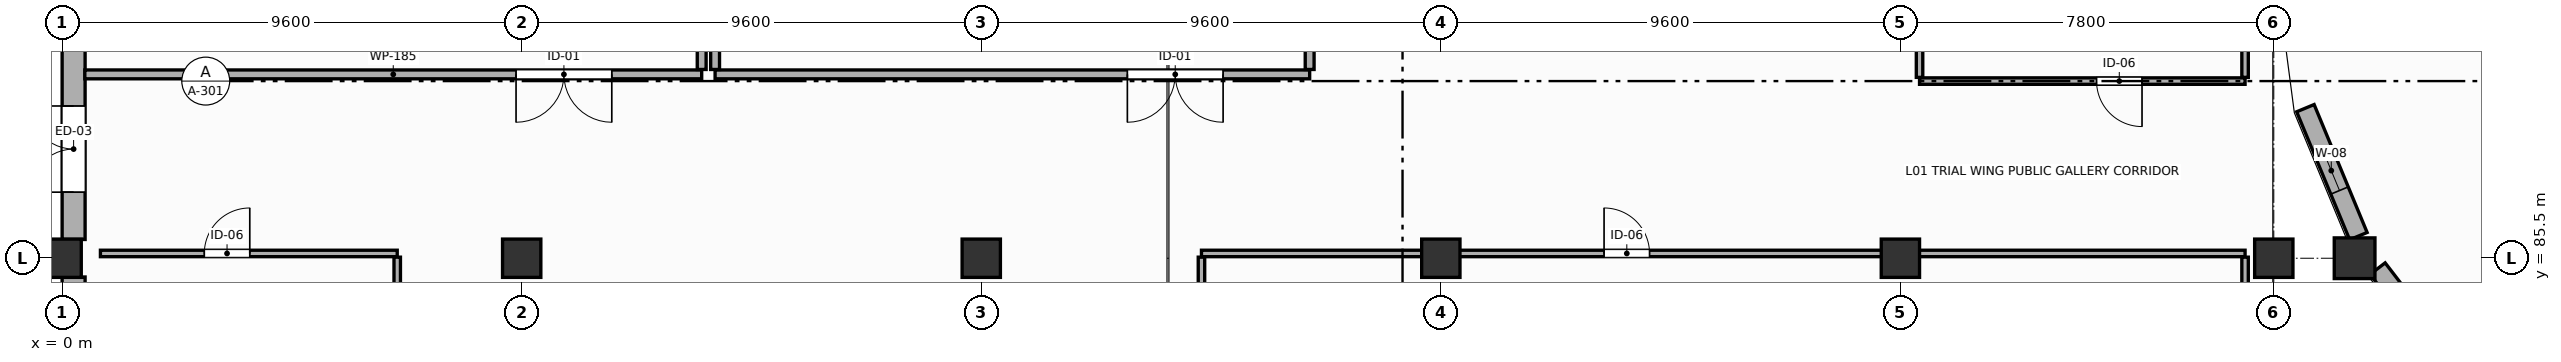
"""IFC4 building model, lengths in metres.
Left out: names, types, materials, properties, quantities, classifications, styles, units other than length and angle.
Written with IfcOpenShell. Run it as: python <this file> out.ifc"""

import sys

from ifc_helpers import new_model, si_unit, direction, frame, frame_2d, origin, origin_2d, place, context, subcontext, project, spatial, rectangle, circle, extrude, element, fill, save


model = new_model("IFC4")
c1 = context("Model", 3, precision=1e-05, world=origin(), true_north=direction((0.0, 1.0)))
c2 = subcontext(c1, "Body", "Model", "MODEL_VIEW")
j1 = project(units=[si_unit("LENGTHUNIT", "METRE"), si_unit("PLANEANGLEUNIT", "RADIAN")], contexts=[c1])
p1 = place(None, origin())
s1 = spatial("IfcSite", under=j1, at=p1, CompositionType="ELEMENT")
p2 = place(p1, origin())
s2 = spatial("IfcBuilding", under=s1, at=p2, CompositionType="ELEMENT")
p3 = place(p2, origin())
s3 = spatial("IfcBuildingStorey", under=s2, at=p3, CompositionType="ELEMENT", Elevation=0.0)
p4 = place(p3, frame((47.888, 85.5, 0.0), z_axis=(0.0, 0.0, 1.0), x_axis=(1.0, 0.0, 0.0)))
e1 = element("IfcColumn", 1, at=p4, inside=s3, PredefinedType="COLUMN", context=c2, shape_type="SweptSolid", body=[
    extrude(circle(Radius=0.425, at=origin_2d()), origin(), (0.0, 0.0, 1.0), 5.4),
])
for number, where, z_axis, x_axis in (
    (2, (0.0, 85.5, 0.0), (0.0, 0.0, 1.0), (1.0, 0.0, 0.0)),
    (3, (9.6, 85.5, 0.0), (0.0, 0.0, 1.0), (1.0, 0.0, 0.0)),
    (4, (19.2, 85.5, 0.0), (0.0, 0.0, 1.0), (1.0, 0.0, 0.0)),
    (5, (28.8, 85.5, 0.0), (0.0, 0.0, 1.0), (1.0, 0.0, 0.0)),
    (6, (38.4, 85.5, 0.0), (0.0, 0.0, 1.0), (1.0, 0.0, 0.0)),
    (7, (46.2, 85.5, 0.0), (0.0, 0.0, 1.0), (1.0, 0.0, 0.0)),
):
    element("IfcColumn", number, at=place(p3, frame(where, z_axis=z_axis, x_axis=x_axis)), inside=s3, PredefinedType="COLUMN", context=c2, shape_type="SweptSolid", body=[
        extrude(rectangle(XDim=0.8, YDim=0.8, at=origin_2d()), origin(), (0.0, 0.0, 1.0), 5.4),
    ])
p5 = place(p3, frame((46.86, 88.635, 0.0), z_axis=(0.0, 0.0, 1.0), x_axis=(0.382642547526, -0.923896466506, 0.0)))
e8 = element("IfcWall", 8, at=p5, inside=s3, PredefinedType="ELEMENTEDWALL", context=c2, shape_type="SweptSolid", body=[
    extrude(rectangle(XDim=2.892, YDim=0.395, at=frame_2d((1.446, 0.0))), origin(), (0.0, 0.0, 1.0), 4.27),
])
p6 = place(p5, frame((0.962, 0.0, 0.85)))
e9 = element("IfcOpeningElement", 9, at=p6, cuts=e8, PredefinedType="OPENING", context=c2, shape_type="SweptSolid", body=[
    extrude(rectangle(XDim=0.9, YDim=1.85, at=frame_2d((0.45, 0.925))), frame((0.0, 0.208, 0.0), z_axis=(0.0, -1.0, 0.0), x_axis=(1.0, 0.0, 0.0)), (0.0, 0.0, 1.0), 0.415),
])
p7 = place(p3, frame((48.369, 85.283, 0.0), z_axis=(0.0, 0.0, 1.0), x_axis=(0.608787157184, -0.793333597705, 0.0)))
e10 = element("IfcWall", 10, at=p7, inside=s3, PredefinedType="ELEMENTEDWALL", context=c2, shape_type="SweptSolid", body=[
    extrude(rectangle(XDim=2.824, YDim=0.395, at=frame_2d((1.412, 0.0))), origin(), (0.0, 0.0, 1.0), 4.27),
])
p8 = place(p7, frame((0.962, 0.0, 0.85)))
e11 = element("IfcOpeningElement", 11, at=p8, cuts=e10, PredefinedType="OPENING", context=c2, shape_type="SweptSolid", body=[
    extrude(rectangle(XDim=0.9, YDim=1.85, at=frame_2d((0.45, 0.925))), frame((0.0, 0.208, 0.0), z_axis=(0.0, -1.0, 0.0), x_axis=(1.0, 0.0, 0.0)), (0.0, 0.0, 1.0), 0.415),
])
p9 = place(p3, frame((0.24, 74.792, 0.0), z_axis=(0.0, 0.0, 1.0), x_axis=(0.0, 1.0, 0.0)))
e12 = element("IfcWall", 12, at=p9, inside=s3, PredefinedType="STANDARD", context=c2, shape_type="SweptSolid", body=[
    extrude(rectangle(XDim=10.316, YDim=0.48, at=frame_2d((5.158, 0.0))), origin(), (0.0, 0.0, 1.0), 4.23),
])
p10 = place(p9, frame((1.295, 0.0, 0.85)))
e13 = element("IfcOpeningElement", 13, at=p10, cuts=e12, PredefinedType="OPENING", context=c2, shape_type="SweptSolid", body=[
    extrude(rectangle(XDim=1.7, YDim=2.3, at=frame_2d((0.85, 1.15))), frame((0.0, 0.25, 0.0), z_axis=(0.0, -1.0, 0.0), x_axis=(1.0, 0.0, 0.0)), (0.0, 0.0, 1.0), 0.5),
])
p11 = place(p9, frame((4.308, 0.0, 0.85)))
e14 = element("IfcOpeningElement", 14, at=p11, cuts=e12, PredefinedType="OPENING", context=c2, shape_type="SweptSolid", body=[
    extrude(rectangle(XDim=1.7, YDim=2.3, at=frame_2d((0.85, 1.15))), frame((0.0, 0.25, 0.0), z_axis=(0.0, -1.0, 0.0), x_axis=(1.0, 0.0, 0.0)), (0.0, 0.0, 1.0), 0.5),
])
p12 = place(p9, frame((7.321, 0.0, 0.85)))
e15 = element("IfcOpeningElement", 15, at=p12, cuts=e12, PredefinedType="OPENING", context=c2, shape_type="SweptSolid", body=[
    extrude(rectangle(XDim=1.7, YDim=2.3, at=frame_2d((0.85, 1.15))), frame((0.0, 0.25, 0.0), z_axis=(0.0, -1.0, 0.0), x_axis=(1.0, 0.0, 0.0)), (0.0, 0.0, 1.0), 0.5),
])
p13 = place(p3, frame((0.24, 85.892, 0.0), z_axis=(0.0, 0.0, 1.0), x_axis=(0.0, 1.0, 0.0)))
e16 = element("IfcWall", 16, at=p13, inside=s3, PredefinedType="STANDARD", context=c2, shape_type="SweptSolid", body=[
    extrude(rectangle(XDim=11.816, YDim=0.48, at=frame_2d((5.908, 0.0))), origin(), (0.0, 0.0, 1.0), 4.18),
])
p14 = place(p13, frame((0.988, 0.0, 0.0)))
e17 = element("IfcOpeningElement", 17, at=p14, cuts=e16, PredefinedType="OPENING", context=c2, shape_type="SweptSolid", body=[
    extrude(rectangle(XDim=1.8, YDim=2.25, at=frame_2d((0.9, 1.125))), frame((0.0, 0.25, 0.0), z_axis=(0.0, -1.0, 0.0), x_axis=(1.0, 0.0, 0.0)), (0.0, 0.0, 1.0), 0.5),
])
p15 = place(p3, frame((13.36, 89.34, 0.0), z_axis=(0.0, 0.0, 1.0), x_axis=(-1.0, 0.0, 0.0)))
e18 = element("IfcWall", 18, at=p15, inside=s3, PredefinedType="PARTITIONING", context=c2, shape_type="SweptSolid", body=[
    extrude(rectangle(XDim=12.886, YDim=0.185, at=frame_2d((6.443, 0.0))), origin(), (0.0, 0.0, 1.0), 4.23),
])
p16 = place(p15, frame((1.878, 0.0, 0.0)))
e19 = element("IfcOpeningElement", 19, at=p16, cuts=e18, PredefinedType="OPENING", context=c2, shape_type="SweptSolid", body=[
    extrude(rectangle(XDim=2.0, YDim=2.5, at=frame_2d((1.0, 1.25))), frame((0.0, 0.103, 0.0), z_axis=(0.0, -1.0, 0.0), x_axis=(1.0, 0.0, 0.0)), (0.0, 0.0, 1.0), 0.205),
])
p17 = place(p3, frame((13.36, 112.326, 0.0), z_axis=(0.0, 0.0, 1.0), x_axis=(0.0, -1.0, 0.0)))
e20 = element("IfcWall", 20, at=p17, inside=s3, PredefinedType="PARTITIONING", context=c2, shape_type="SweptSolid", body=[
    extrude(rectangle(XDim=22.884, YDim=0.185, at=frame_2d((11.442, 0.0))), origin(), (0.0, 0.0, 1.0), 4.33),
])
p18 = place(p3, frame((26.06, 89.34, 0.0), z_axis=(0.0, 0.0, 1.0), x_axis=(-1.0, 0.0, 0.0)))
e21 = element("IfcWall", 21, at=p18, inside=s3, PredefinedType="PARTITIONING", context=c2, shape_type="SweptSolid", body=[
    extrude(rectangle(XDim=12.42, YDim=0.185, at=frame_2d((6.21, 0.0))), origin(), (0.0, 0.0, 1.0), 4.23),
])
p19 = place(p18, frame((1.808, 0.0, 0.0)))
e22 = element("IfcOpeningElement", 22, at=p19, cuts=e21, PredefinedType="OPENING", context=c2, shape_type="SweptSolid", body=[
    extrude(rectangle(XDim=2.0, YDim=2.5, at=frame_2d((1.0, 1.25))), frame((0.0, 0.103, 0.0), z_axis=(0.0, -1.0, 0.0), x_axis=(1.0, 0.0, 0.0)), (0.0, 0.0, 1.0), 0.205),
])
for number, where, z_axis, x_axis in (
    (23, (13.64, 89.442, 0.0), (0.0, 0.0, 1.0), (0.0, 1.0, 0.0)),
    (24, (26.06, 97.597, 0.0), (0.0, 0.0, 1.0), (0.0, -1.0, 0.0)),
):
    element("IfcWall", number, at=place(p3, frame(where, z_axis=z_axis, x_axis=x_axis)), inside=s3, PredefinedType="PARTITIONING", context=c2, shape_type="SweptSolid", body=[
        extrude(rectangle(XDim=8.155, YDim=0.185, at=frame_2d((4.078, 0.0))), origin(), (0.0, 0.0, 1.0), 4.48),
    ])
p20 = place(p3, frame((45.6, 89.2, 0.0), z_axis=(0.0, 0.0, 1.0), x_axis=(-1.0, 0.0, 0.0)))
e25 = element("IfcWall", 25, at=p20, inside=s3, PredefinedType="PARTITIONING", context=c2, shape_type="SweptSolid", body=[
    extrude(rectangle(XDim=6.8, YDim=0.135, at=frame_2d((3.4, 0.0))), origin(), (0.0, 0.0, 1.0), 4.23),
])
p21 = place(p20, frame((2.153, 0.0, 0.0)))
e26 = element("IfcOpeningElement", 26, at=p21, cuts=e25, PredefinedType="OPENING", context=c2, shape_type="SweptSolid", body=[
    extrude(rectangle(XDim=0.95, YDim=2.15, at=frame_2d((0.475, 1.075))), frame((0.0, 0.077, 0.0), z_axis=(0.0, -1.0, 0.0), x_axis=(1.0, 0.0, 0.0)), (0.0, 0.0, 1.0), 0.155),
])
p22 = place(p3, frame((38.8, 89.278, 0.0), z_axis=(0.0, 0.0, 1.0), x_axis=(0.0, 1.0, 0.0)))
e27 = element("IfcWall", 27, at=p22, inside=s3, PredefinedType="PARTITIONING", context=c2, shape_type="SweptSolid", body=[
    extrude(rectangle(XDim=12.645, YDim=0.135, at=frame_2d((6.323, 0.0))), origin(), (0.0, 0.0, 1.0), 4.18),
])
p23 = place(p3, frame((45.6, 101.923, 0.0), z_axis=(0.0, 0.0, 1.0), x_axis=(0.0, -1.0, 0.0)))
e28 = element("IfcWall", 28, at=p23, inside=s3, PredefinedType="PARTITIONING", context=c2, shape_type="SweptSolid", body=[
    extrude(rectangle(XDim=12.645, YDim=0.135, at=frame_2d((6.323, 0.0))), origin(), (0.0, 0.0, 1.0), 4.47),
])
p24 = place(p3, frame((0.8, 85.6, 0.0), z_axis=(0.0, 0.0, 1.0), x_axis=(1.0, 0.0, 0.0)))
e29 = element("IfcWall", 29, at=p24, inside=s3, PredefinedType="PARTITIONING", context=c2, shape_type="SweptSolid", body=[
    extrude(rectangle(XDim=6.2, YDim=0.135, at=frame_2d((3.1, 0.0))), origin(), (0.0, 0.0, 1.0), 4.33),
])
p25 = place(p24, frame((2.17, 0.0, 0.0)))
e30 = element("IfcOpeningElement", 30, at=p25, cuts=e29, PredefinedType="OPENING", context=c2, shape_type="SweptSolid", body=[
    extrude(rectangle(XDim=0.95, YDim=2.15, at=frame_2d((0.475, 1.075))), frame((0.0, 0.077, 0.0), z_axis=(0.0, -1.0, 0.0), x_axis=(1.0, 0.0, 0.0)), (0.0, 0.0, 1.0), 0.155),
])
p26 = place(p3, frame((7.0, 85.522, 0.0), z_axis=(0.0, 0.0, 1.0), x_axis=(0.0, -1.0, 0.0)))
e31 = element("IfcWall", 31, at=p26, inside=s3, PredefinedType="PARTITIONING", context=c2, shape_type="SweptSolid", body=[
    extrude(rectangle(XDim=17.645, YDim=0.135, at=frame_2d((8.823, 0.0))), origin(), (0.0, 0.0, 1.0), 4.33),
])
p27 = place(p3, frame((23.8, 85.6, 0.0), z_axis=(0.0, 0.0, 1.0), x_axis=(1.0, 0.0, 0.0)))
e32 = element("IfcWall", 32, at=p27, inside=s3, PredefinedType="PARTITIONING", context=c2, shape_type="SweptSolid", body=[
    extrude(rectangle(XDim=21.8, YDim=0.135, at=frame_2d((10.9, 0.0))), origin(), (0.0, 0.0, 1.0), 4.23),
])
p28 = place(p27, frame((8.41, 0.0, 0.0)))
e33 = element("IfcOpeningElement", 33, at=p28, cuts=e32, PredefinedType="OPENING", context=c2, shape_type="SweptSolid", body=[
    extrude(rectangle(XDim=0.95, YDim=2.15, at=frame_2d((0.475, 1.075))), frame((0.0, 0.077, 0.0), z_axis=(0.0, -1.0, 0.0), x_axis=(1.0, 0.0, 0.0)), (0.0, 0.0, 1.0), 0.155),
])
p29 = place(p3, frame((23.8, 67.877, 0.0), z_axis=(0.0, 0.0, 1.0), x_axis=(0.0, 1.0, 0.0)))
e34 = element("IfcWall", 34, at=p29, inside=s3, PredefinedType="PARTITIONING", context=c2, shape_type="SweptSolid", body=[
    extrude(rectangle(XDim=17.645, YDim=0.135, at=frame_2d((8.823, 0.0))), origin(), (0.0, 0.0, 1.0), 4.33),
])
p30 = place(p3, frame((45.6, 85.522, 0.0), z_axis=(0.0, 0.0, 1.0), x_axis=(0.0, -1.0, 0.0)))
e35 = element("IfcWall", 35, at=p30, inside=s3, PredefinedType="PARTITIONING", context=c2, shape_type="SweptSolid", body=[
    extrude(rectangle(XDim=18.348, YDim=0.135, at=frame_2d((9.174, 0.0))), origin(), (0.0, 0.0, 1.0), 4.47),
])
p31 = place(p6, origin())
e36 = element("IfcWindow", 36, at=p31, inside=s3, PartitioningType="SINGLE_PANEL", PredefinedType="WINDOW", context=c2, shape_type="SweptSolid", body=[
    extrude(rectangle(XDim=0.9, YDim=1.85, at=frame_2d((0.45, 0.925))), frame((0.0, 0.03, 0.0), z_axis=(0.0, -1.0, 0.0), x_axis=(1.0, 0.0, 0.0)), (0.0, 0.0, 1.0), 0.06),
])
fill(e9, e36)
p32 = place(p14, origin())
e37 = element("IfcDoor", 37, at=p32, inside=s3, OperationType="DOUBLE_DOOR_SINGLE_SWING", PredefinedType="DOOR", context=c2, shape_type="SweptSolid", body=[
    extrude(rectangle(XDim=1.8, YDim=2.25, at=frame_2d((0.9, 1.125))), frame((0.0, 0.025, 0.0), z_axis=(0.0, -1.0, 0.0), x_axis=(1.0, 0.0, 0.0)), (0.0, 0.0, 1.0), 0.05),
])
fill(e17, e37)
p33 = place(p16, origin())
e38 = element("IfcDoor", 38, at=p33, inside=s3, OperationType="DOUBLE_DOOR_SINGLE_SWING", PredefinedType="DOOR", context=c2, shape_type="SweptSolid", body=[
    extrude(rectangle(XDim=2.0, YDim=2.5, at=frame_2d((1.0, 1.25))), frame((0.0, 0.025, 0.0), z_axis=(0.0, -1.0, 0.0), x_axis=(1.0, 0.0, 0.0)), (0.0, 0.0, 1.0), 0.05),
])
fill(e19, e38)
p34 = place(p19, origin())
e39 = element("IfcDoor", 39, at=p34, inside=s3, OperationType="DOUBLE_DOOR_SINGLE_SWING", PredefinedType="DOOR", context=c2, shape_type="SweptSolid", body=[
    extrude(rectangle(XDim=2.0, YDim=2.5, at=frame_2d((1.0, 1.25))), frame((0.0, 0.025, 0.0), z_axis=(0.0, -1.0, 0.0), x_axis=(1.0, 0.0, 0.0)), (0.0, 0.0, 1.0), 0.05),
])
fill(e22, e39)
p35 = place(p21, origin())
e40 = element("IfcDoor", 40, at=p35, inside=s3, OperationType="SINGLE_SWING_LEFT", PredefinedType="DOOR", context=c2, shape_type="SweptSolid", body=[
    extrude(rectangle(XDim=0.95, YDim=2.15, at=frame_2d((0.475, 1.075))), frame((0.0, 0.025, 0.0), z_axis=(0.0, -1.0, 0.0), x_axis=(1.0, 0.0, 0.0)), (0.0, 0.0, 1.0), 0.05),
])
fill(e26, e40)
p36 = place(p25, origin())
e41 = element("IfcDoor", 41, at=p36, inside=s3, OperationType="SINGLE_SWING_RIGHT", PredefinedType="DOOR", context=c2, shape_type="SweptSolid", body=[
    extrude(rectangle(XDim=0.95, YDim=2.15, at=frame_2d((0.475, 1.075))), frame((0.0, 0.025, 0.0), z_axis=(0.0, -1.0, 0.0), x_axis=(1.0, 0.0, 0.0)), (0.0, 0.0, 1.0), 0.05),
])
fill(e30, e41)
p37 = place(p28, origin())
e42 = element("IfcDoor", 42, at=p37, inside=s3, OperationType="SINGLE_SWING_LEFT", PredefinedType="DOOR", context=c2, shape_type="SweptSolid", body=[
    extrude(rectangle(XDim=0.95, YDim=2.15, at=frame_2d((0.475, 1.075))), frame((0.0, 0.025, 0.0), z_axis=(0.0, -1.0, 0.0), x_axis=(1.0, 0.0, 0.0)), (0.0, 0.0, 1.0), 0.05),
])
fill(e33, e42)
save(model, sys.argv[1])
